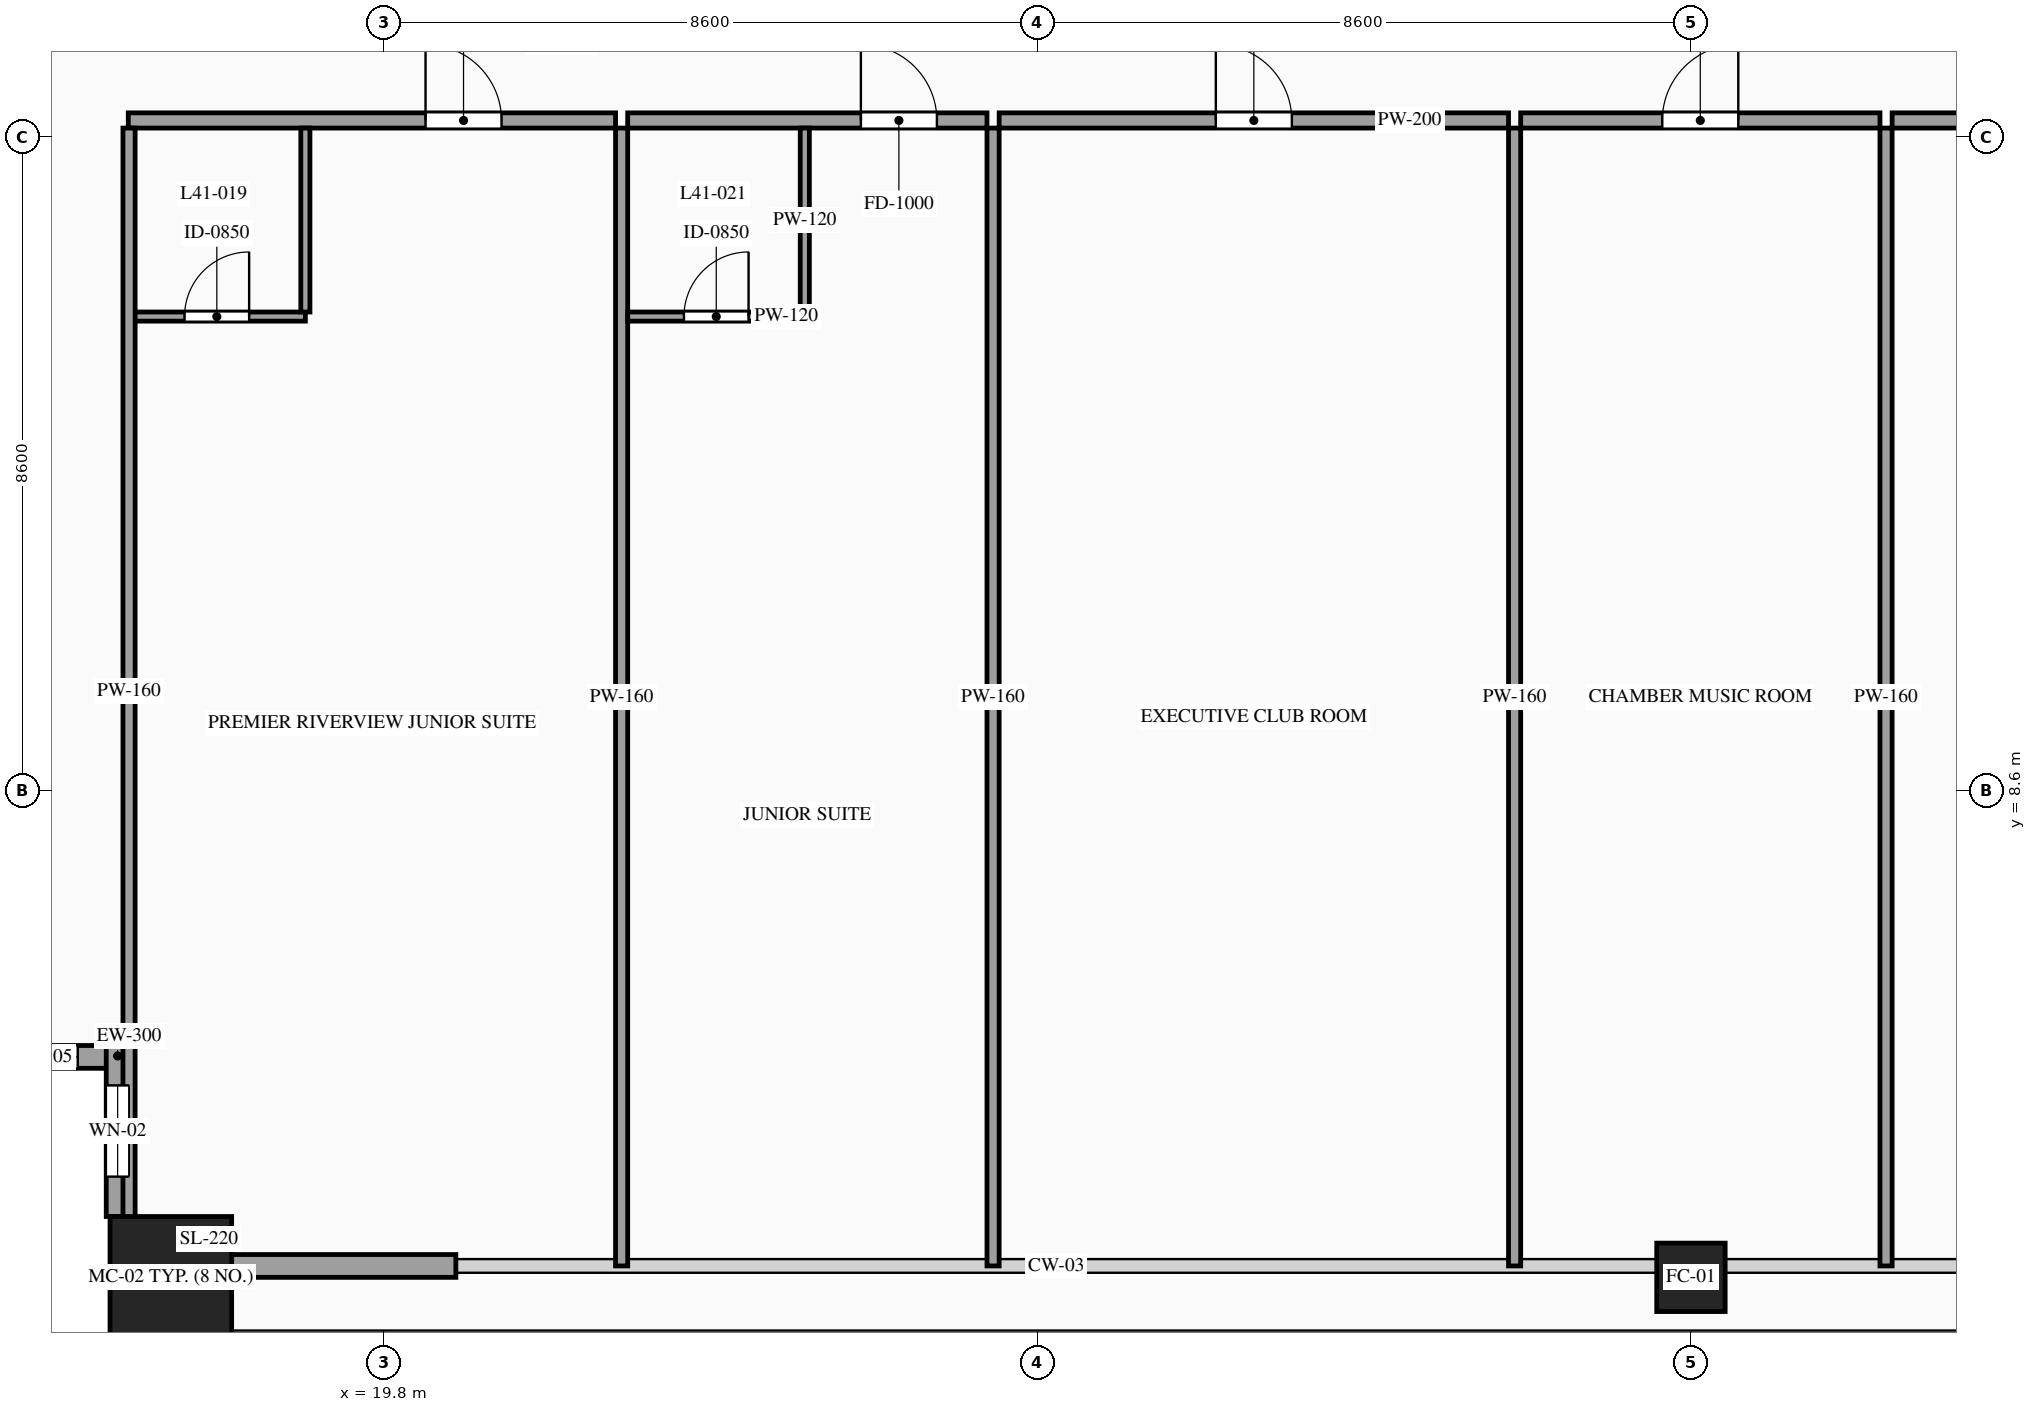
"""IFC4 building model, lengths in metres.
Left out: names, types, materials, properties, quantities, classifications, styles, units other than length and angle.
Written with IfcOpenShell. Run it as: python <this file> out.ifc"""

import sys

from ifc_helpers import new_model, si_unit, direction, frame, frame_2d, origin, origin_2d, place, context, subcontext, project, spatial, rectangle, hollow_rectangle, extrude, source, transform, mapped, element, fill, save


model = new_model("IFC4")
c1 = context("Model", 3, precision=1e-05, world=origin(), true_north=direction((0.0, 1.0)))
c2 = subcontext(c1, "Body", "Model", "MODEL_VIEW")
j1 = project(units=[si_unit("LENGTHUNIT", "METRE"), si_unit("PLANEANGLEUNIT", "RADIAN")], contexts=[c1])
p1 = place(None, origin())
s1 = spatial("IfcSite", under=j1, at=p1, CompositionType="ELEMENT")
p2 = place(p1, origin())
s2 = spatial("IfcBuilding", under=s1, at=p2, CompositionType="ELEMENT")
p3 = place(p2, frame((0.0, 0.0, 156.0)))
s3 = spatial("IfcBuildingStorey", under=s2, at=p3, CompositionType="ELEMENT", Elevation=156.0)
m1 = source(origin(), c2, "Body", "SweptSolid", [
    extrude(hollow_rectangle(XDim=1.6, YDim=1.6, WallThickness=0.07, at=origin_2d()), origin(), (0.0, 0.0, 1.0), 3.6),
])
p4 = place(p3, frame((17.0, 2.2, 0.0), z_axis=(0.0, 0.0, 1.0), x_axis=(1.0, 0.0, 0.0)))
e1 = element("IfcColumn", 1, at=p4, inside=s3, PredefinedType="COLUMN", context=c2, shape_type="MappedRepresentation", body=[
    mapped(m1, transform((0.0, 0.0, 0.0), scale=1.0)),
])
m2 = source(origin(), c2, "Body", "SweptSolid", [
    extrude(hollow_rectangle(XDim=0.9, YDim=0.9, WallThickness=0.042, at=origin_2d()), origin(), (0.0, 0.0, 1.0), 3.6),
])
p5 = place(p3, frame((37.0, 2.2, 0.0), z_axis=(0.0, 0.0, 1.0), x_axis=(1.0, 0.0, 0.0)))
e2 = element("IfcColumn", 2, at=p5, inside=s3, PredefinedType="COLUMN", context=c2, shape_type="MappedRepresentation", body=[
    mapped(m2, transform((0.0, 0.0, 0.0), scale=1.0)),
])
p6 = place(p3, frame((14.2, 5.1, 0.0), z_axis=(0.0, 0.0, 1.0), x_axis=(1.0, 0.0, 0.0)))
e3 = element("IfcWall", 3, at=p6, inside=s3, PredefinedType="SOLIDWALL", context=c2, shape_type="SweptSolid", body=[
    extrude(rectangle(XDim=2.25, YDim=0.3, at=frame_2d((1.125, 0.0))), origin(), (0.0, 0.0, 1.0), 3.38),
])
p7 = place(p6, frame((0.675, 0.0, 0.85)))
e4 = element("IfcOpeningElement", 4, at=p7, cuts=e3, PredefinedType="OPENING", context=c2, shape_type="SweptSolid", body=[
    extrude(rectangle(XDim=0.9, YDim=1.5, at=frame_2d((0.45, 0.75))), frame((0.0, 0.165, 0.0), z_axis=(0.0, -1.0, 0.0), x_axis=(1.0, 0.0, 0.0)), (0.0, 0.0, 1.0), 0.33),
])
p8 = place(p3, frame((16.3, 5.25, 0.0), z_axis=(0.0, 0.0, 1.0), x_axis=(0.0, -1.0, 0.0)))
e5 = element("IfcWall", 5, at=p8, inside=s3, PredefinedType="SOLIDWALL", context=c2, shape_type="SweptSolid", body=[
    extrude(rectangle(XDim=2.25, YDim=0.3, at=frame_2d((1.125, 0.0))), origin(), (0.0, 0.0, 1.0), 3.38),
])
p9 = place(p8, frame((0.525, 0.0, 0.85)))
e6 = element("IfcOpeningElement", 6, at=p9, cuts=e5, PredefinedType="OPENING", context=c2, shape_type="SweptSolid", body=[
    extrude(rectangle(XDim=1.2, YDim=2.1, at=frame_2d((0.6, 1.05))), frame((0.0, 0.165, 0.0), z_axis=(0.0, -1.0, 0.0), x_axis=(1.0, 0.0, 0.0)), (0.0, 0.0, 1.0), 0.33),
])
m3 = source(origin(), c2, "Body", "SweptSolid", [
    extrude(rectangle(XDim=2.95, YDim=0.3, at=frame_2d((1.475, 0.0))), origin(), (0.0, 0.0, 1.0), 2.775),
])
p10 = place(p3, frame((17.8, 2.35, 0.0), z_axis=(0.0, 0.0, 1.0), x_axis=(1.0, 0.0, 0.0)))
e7 = element("IfcWall", 7, at=p10, inside=s3, PredefinedType="SOLIDWALL", context=c2, shape_type="MappedRepresentation", body=[
    mapped(m3, transform((0.0, 0.0, 0.0), scale=1.0)),
])
p11 = place(p3, frame((16.44, 17.42, 0.0), z_axis=(0.0, 0.0, 1.0), x_axis=(1.0, 0.0, 0.0)))
e8 = element("IfcWall", 8, at=p11, inside=s3, PredefinedType="PARTITIONING", context=c2, shape_type="SweptSolid", body=[
    extrude(rectangle(XDim=6.411, YDim=0.2, at=frame_2d((3.206, 0.0))), origin(), (0.0, 0.0, 1.0), 3.38),
])
p12 = place(p11, frame((3.911, 0.0, 0.0)))
e9 = element("IfcOpeningElement", 9, at=p12, cuts=e8, PredefinedType="OPENING", context=c2, shape_type="SweptSolid", body=[
    extrude(rectangle(XDim=1.0, YDim=2.2, at=frame_2d((0.5, 1.1))), frame((0.0, 0.115, 0.0), z_axis=(0.0, -1.0, 0.0), x_axis=(1.0, 0.0, 0.0)), (0.0, 0.0, 1.0), 0.23),
])
m4 = source(origin(), c2, "Body", "SweptSolid", [
    extrude(rectangle(XDim=14.97, YDim=0.16, at=frame_2d((7.485, 0.0))), origin(), (0.0, 0.0, 1.0), 3.38),
])
p13 = place(p3, frame((22.931, 2.35, 0.0), z_axis=(0.0, 0.0, 1.0), x_axis=(0.0, 1.0, 0.0)))
e10 = element("IfcWall", 10, at=p13, inside=s3, PredefinedType="PARTITIONING", context=c2, shape_type="MappedRepresentation", body=[
    mapped(m4, transform((0.0, 0.0, 0.0), scale=1.0)),
])
p14 = place(p3, frame((16.44, 14.84, 0.0), z_axis=(0.0, 0.0, 1.0), x_axis=(1.0, 0.0, 0.0)))
e11 = element("IfcWall", 11, at=p14, inside=s3, PredefinedType="PARTITIONING", context=c2, shape_type="SweptSolid", body=[
    extrude(rectangle(XDim=2.33, YDim=0.12, at=frame_2d((1.165, 0.0))), origin(), (0.0, 0.0, 1.0), 3.38),
])
p15 = place(p14, frame((0.74, 0.0, 0.0)))
e12 = element("IfcOpeningElement", 12, at=p15, cuts=e11, PredefinedType="OPENING", context=c2, shape_type="SweptSolid", body=[
    extrude(rectangle(XDim=0.85, YDim=2.1, at=frame_2d((0.425, 1.05))), frame((0.0, 0.075, 0.0), z_axis=(0.0, -1.0, 0.0), x_axis=(1.0, 0.0, 0.0)), (0.0, 0.0, 1.0), 0.15),
])
m5 = source(origin(), c2, "Body", "SweptSolid", [
    extrude(rectangle(XDim=2.42, YDim=0.12, at=frame_2d((1.21, 0.0))), origin(), (0.0, 0.0, 1.0), 3.38),
])
p16 = place(p3, frame((18.77, 14.9, 0.0), z_axis=(0.0, 0.0, 1.0), x_axis=(0.0, 1.0, 0.0)))
e13 = element("IfcWall", 13, at=p16, inside=s3, PredefinedType="PARTITIONING", context=c2, shape_type="MappedRepresentation", body=[
    mapped(m5, transform((0.0, 0.0, 0.0), scale=1.0)),
])
p17 = place(p3, frame((23.011, 17.42, 0.0), z_axis=(0.0, 0.0, 1.0), x_axis=(1.0, 0.0, 0.0)))
e14 = element("IfcWall", 14, at=p17, inside=s3, PredefinedType="PARTITIONING", context=c2, shape_type="SweptSolid", body=[
    extrude(rectangle(XDim=4.727, YDim=0.2, at=frame_2d((2.364, 0.0))), origin(), (0.0, 0.0, 1.0), 3.38),
])
p18 = place(p17, frame((3.068, 0.0, 0.0)))
e15 = element("IfcOpeningElement", 15, at=p18, cuts=e14, PredefinedType="OPENING", context=c2, shape_type="SweptSolid", body=[
    extrude(rectangle(XDim=1.0, YDim=2.2, at=frame_2d((0.5, 1.1))), frame((0.0, 0.115, 0.0), z_axis=(0.0, -1.0, 0.0), x_axis=(1.0, 0.0, 0.0)), (0.0, 0.0, 1.0), 0.23),
])
p19 = place(p3, frame((27.818, 2.35, 0.0), z_axis=(0.0, 0.0, 1.0), x_axis=(0.0, 1.0, 0.0)))
e16 = element("IfcWall", 16, at=p19, inside=s3, PredefinedType="PARTITIONING", context=c2, shape_type="MappedRepresentation", body=[
    mapped(m4, transform((0.0, 0.0, 0.0), scale=1.0)),
])
p20 = place(p3, frame((23.011, 14.84, 0.0), z_axis=(0.0, 0.0, 1.0), x_axis=(1.0, 0.0, 0.0)))
e17 = element("IfcWall", 17, at=p20, inside=s3, PredefinedType="PARTITIONING", context=c2, shape_type="SweptSolid", body=[
    extrude(rectangle(XDim=2.33, YDim=0.12, at=frame_2d((1.165, 0.0))), origin(), (0.0, 0.0, 1.0), 3.38),
])
p21 = place(p20, frame((0.74, 0.0, 0.0)))
e18 = element("IfcOpeningElement", 18, at=p21, cuts=e17, PredefinedType="OPENING", context=c2, shape_type="SweptSolid", body=[
    extrude(rectangle(XDim=0.85, YDim=2.1, at=frame_2d((0.425, 1.05))), frame((0.0, 0.075, 0.0), z_axis=(0.0, -1.0, 0.0), x_axis=(1.0, 0.0, 0.0)), (0.0, 0.0, 1.0), 0.15),
])
p22 = place(p3, frame((25.341, 14.9, 0.0), z_axis=(0.0, 0.0, 1.0), x_axis=(0.0, 1.0, 0.0)))
e19 = element("IfcWall", 19, at=p22, inside=s3, PredefinedType="PARTITIONING", context=c2, shape_type="MappedRepresentation", body=[
    mapped(m5, transform((0.0, 0.0, 0.0), scale=1.0)),
])
p23 = place(p3, frame((27.898, 17.42, 0.0), z_axis=(0.0, 0.0, 1.0), x_axis=(1.0, 0.0, 0.0)))
e20 = element("IfcWall", 20, at=p23, inside=s3, PredefinedType="PARTITIONING", context=c2, shape_type="SweptSolid", body=[
    extrude(rectangle(XDim=6.702, YDim=0.2, at=frame_2d((3.351, 0.0))), origin(), (0.0, 0.0, 1.0), 3.38),
])
p24 = place(p23, frame((2.851, 0.0, 0.0)))
e21 = element("IfcOpeningElement", 21, at=p24, cuts=e20, PredefinedType="OPENING", context=c2, shape_type="SweptSolid", body=[
    extrude(rectangle(XDim=1.0, YDim=2.2, at=frame_2d((0.5, 1.1))), frame((0.0, 0.115, 0.0), z_axis=(0.0, -1.0, 0.0), x_axis=(1.0, 0.0, 0.0)), (0.0, 0.0, 1.0), 0.23),
])
p25 = place(p3, frame((34.68, 2.35, 0.0), z_axis=(0.0, 0.0, 1.0), x_axis=(0.0, 1.0, 0.0)))
e22 = element("IfcWall", 22, at=p25, inside=s3, PredefinedType="PARTITIONING", context=c2, shape_type="MappedRepresentation", body=[
    mapped(m4, transform((0.0, 0.0, 0.0), scale=1.0)),
])
p26 = place(p3, frame((34.76, 17.42, 0.0), z_axis=(0.0, 0.0, 1.0), x_axis=(1.0, 0.0, 0.0)))
e23 = element("IfcWall", 23, at=p26, inside=s3, PredefinedType="PARTITIONING", context=c2, shape_type="SweptSolid", body=[
    extrude(rectangle(XDim=4.727, YDim=0.2, at=frame_2d((2.364, 0.0))), origin(), (0.0, 0.0, 1.0), 3.38),
])
p27 = place(p26, frame((1.863, 0.0, 0.0)))
e24 = element("IfcOpeningElement", 24, at=p27, cuts=e23, PredefinedType="OPENING", context=c2, shape_type="SweptSolid", body=[
    extrude(rectangle(XDim=1.0, YDim=2.2, at=frame_2d((0.5, 1.1))), frame((0.0, 0.115, 0.0), z_axis=(0.0, -1.0, 0.0), x_axis=(1.0, 0.0, 0.0)), (0.0, 0.0, 1.0), 0.23),
])
p28 = place(p3, frame((39.567, 2.35, 0.0), z_axis=(0.0, 0.0, 1.0), x_axis=(0.0, 1.0, 0.0)))
e25 = element("IfcWall", 25, at=p28, inside=s3, PredefinedType="PARTITIONING", context=c2, shape_type="MappedRepresentation", body=[
    mapped(m4, transform((0.0, 0.0, 0.0), scale=1.0)),
])
p29 = place(p3, frame((39.647, 17.42, 0.0), z_axis=(0.0, 0.0, 1.0), x_axis=(1.0, 0.0, 0.0)))
e26 = element("IfcWall", 26, at=p29, inside=s3, PredefinedType="PARTITIONING", context=c2, shape_type="SweptSolid", body=[
    extrude(rectangle(XDim=6.701, YDim=0.2, at=frame_2d((3.351, 0.0))), origin(), (0.0, 0.0, 1.0), 3.38),
])
p30 = place(p29, frame((2.851, 0.0, 0.0)))
e27 = element("IfcOpeningElement", 27, at=p30, cuts=e26, PredefinedType="OPENING", context=c2, shape_type="SweptSolid", body=[
    extrude(rectangle(XDim=1.0, YDim=2.2, at=frame_2d((0.5, 1.1))), frame((0.0, 0.115, 0.0), z_axis=(0.0, -1.0, 0.0), x_axis=(1.0, 0.0, 0.0)), (0.0, 0.0, 1.0), 0.23),
])
m6 = source(origin(), c2, "Body", "SweptSolid", [
    extrude(rectangle(XDim=14.82, YDim=0.16, at=frame_2d((7.41, 0.0))), origin(), (0.0, 0.0, 1.0), 3.38),
])
p31 = place(p3, frame((16.45, 2.5, 0.0), z_axis=(0.0, 0.0, 1.0), x_axis=(0.0, 1.0, 0.0)))
e28 = element("IfcWall", 28, at=p31, inside=s3, PredefinedType="PARTITIONING", context=c2, shape_type="MappedRepresentation", body=[
    mapped(m6, transform((0.0, 0.0, 0.0), scale=1.0)),
])
m7 = source(origin(), c2, "Body", "SweptSolid", [
    extrude(rectangle(XDim=0.9, YDim=1.5, at=frame_2d((0.45, 0.75))), frame((0.0, 0.03, 0.0), z_axis=(0.0, -1.0, 0.0), x_axis=(1.0, 0.0, 0.0)), (0.0, 0.0, 1.0), 0.06),
])
p32 = place(p7, origin())
e29 = element("IfcWindow", 29, at=p32, inside=s3, PartitioningType="SINGLE_PANEL", PredefinedType="WINDOW", context=c2, shape_type="MappedRepresentation", body=[
    mapped(m7, transform((0.0, 0.0, 0.0), scale=1.0)),
])
fill(e4, e29)
m8 = source(origin(), c2, "Body", "SweptSolid", [
    extrude(rectangle(XDim=1.2, YDim=2.1, at=frame_2d((0.6, 1.05))), frame((0.0, 0.03, 0.0), z_axis=(0.0, -1.0, 0.0), x_axis=(1.0, 0.0, 0.0)), (0.0, 0.0, 1.0), 0.06),
])
p33 = place(p9, origin())
e30 = element("IfcWindow", 30, at=p33, inside=s3, PartitioningType="SINGLE_PANEL", PredefinedType="WINDOW", context=c2, shape_type="MappedRepresentation", body=[
    mapped(m8, transform((0.0, 0.0, 0.0), scale=1.0)),
])
fill(e6, e30)
m9 = source(origin(), c2, "Body", "SweptSolid", [
    extrude(rectangle(XDim=1.0, YDim=2.2, at=frame_2d((0.5, 1.1))), frame((0.0, 0.025, 0.0), z_axis=(0.0, -1.0, 0.0), x_axis=(1.0, 0.0, 0.0)), (0.0, 0.0, 1.0), 0.05),
])
p34 = place(p12, origin())
e31 = element("IfcDoor", 31, at=p34, inside=s3, OperationType="SINGLE_SWING_LEFT", PredefinedType="DOOR", context=c2, shape_type="MappedRepresentation", body=[
    mapped(m9, transform((0.0, 0.0, 0.0), scale=1.0)),
])
fill(e9, e31)
m10 = source(origin(), c2, "Body", "SweptSolid", [
    extrude(rectangle(XDim=0.85, YDim=2.1, at=frame_2d((0.425, 1.05))), frame((0.0, 0.025, 0.0), z_axis=(0.0, -1.0, 0.0), x_axis=(1.0, 0.0, 0.0)), (0.0, 0.0, 1.0), 0.05),
])
p35 = place(p15, origin())
e32 = element("IfcDoor", 32, at=p35, inside=s3, OperationType="SINGLE_SWING_RIGHT", PredefinedType="DOOR", context=c2, shape_type="MappedRepresentation", body=[
    mapped(m10, transform((0.0, 0.0, 0.0), scale=1.0)),
])
fill(e12, e32)
p36 = place(p18, origin())
e33 = element("IfcDoor", 33, at=p36, inside=s3, OperationType="SINGLE_SWING_LEFT", PredefinedType="DOOR", context=c2, shape_type="MappedRepresentation", body=[
    mapped(m9, transform((0.0, 0.0, 0.0), scale=1.0)),
])
fill(e15, e33)
p37 = place(p21, origin())
e34 = element("IfcDoor", 34, at=p37, inside=s3, OperationType="SINGLE_SWING_RIGHT", PredefinedType="DOOR", context=c2, shape_type="MappedRepresentation", body=[
    mapped(m10, transform((0.0, 0.0, 0.0), scale=1.0)),
])
fill(e18, e34)
p38 = place(p24, origin())
e35 = element("IfcDoor", 35, at=p38, inside=s3, OperationType="SINGLE_SWING_LEFT", PredefinedType="DOOR", context=c2, shape_type="MappedRepresentation", body=[
    mapped(m9, transform((0.0, 0.0, 0.0), scale=1.0)),
])
fill(e21, e35)
p39 = place(p27, origin())
e36 = element("IfcDoor", 36, at=p39, inside=s3, OperationType="SINGLE_SWING_RIGHT", PredefinedType="DOOR", context=c2, shape_type="MappedRepresentation", body=[
    mapped(m9, transform((0.0, 0.0, 0.0), scale=1.0)),
])
fill(e24, e36)
save(model, sys.argv[1])
